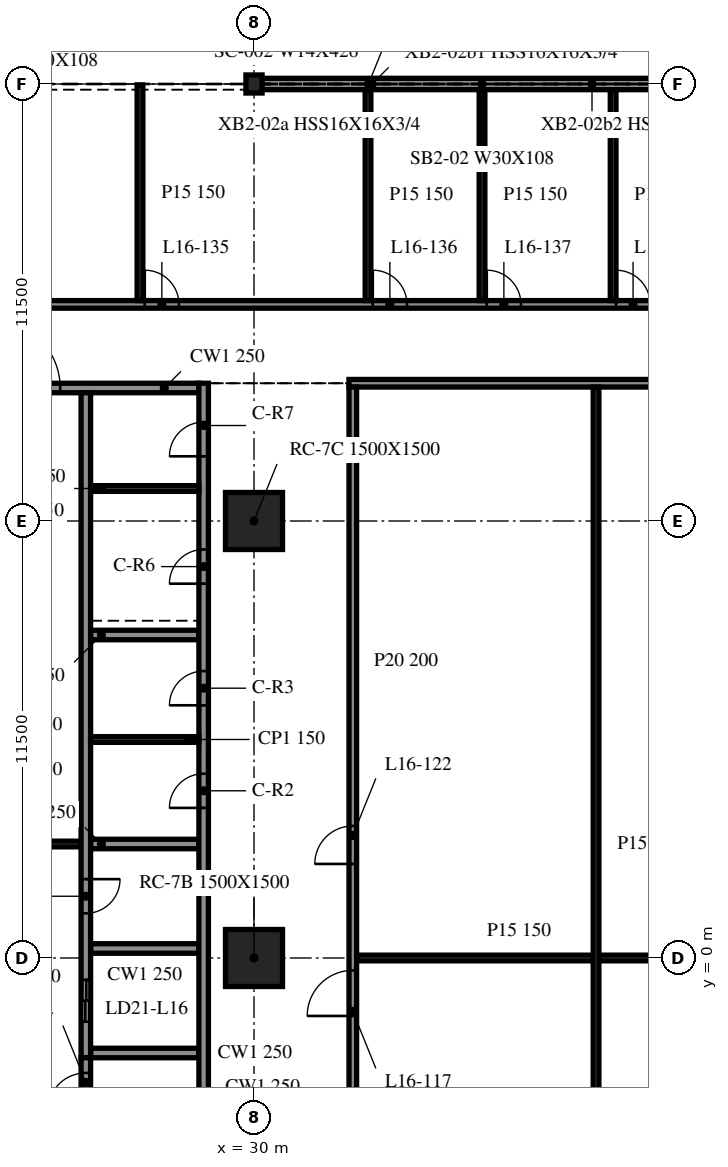
"""IFC4 building model, lengths in metres.
Left out: names, types, materials, properties, quantities, classifications, styles, units other than length and angle.
Written with IfcOpenShell. Run it as: python <this file> out.ifc"""

import sys

from ifc_helpers import new_model, si_unit, direction, frame, frame_2d, origin, origin_2d, place, context, subcontext, project, spatial, rectangle, i_section, extrude, element, fill, save


model = new_model("IFC4")
c1 = context("Model", 3, precision=1e-05, world=origin(), true_north=direction((0.0, 1.0)))
c2 = subcontext(c1, "Body", "Model", "MODEL_VIEW")
j1 = project(units=[si_unit("LENGTHUNIT", "METRE"), si_unit("PLANEANGLEUNIT", "RADIAN")], contexts=[c1])
p1 = place(None, origin())
s1 = spatial("IfcSite", under=j1, at=p1, CompositionType="ELEMENT")
p2 = place(p1, origin())
s2 = spatial("IfcBuilding", under=s1, at=p2, CompositionType="ELEMENT")
p3 = place(p2, frame((0.0, 0.0, 71.8)))
s3 = spatial("IfcBuildingStorey", under=s2, at=p3, CompositionType="ELEMENT", Elevation=71.8)
for number, where, z_axis, x_axis in (
    (1, (30.0, 0.0, -0.34), (0.0, 0.0, 1.0), (1.0, 0.0, 0.0)),
    (2, (30.0, 11.5, -0.34), (0.0, 0.0, 1.0), (1.0, 0.0, 0.0)),
):
    element("IfcColumn", number, at=place(p3, frame(where, z_axis=z_axis, x_axis=x_axis)), inside=s3, PredefinedType="COLUMN", context=c2, shape_type="SweptSolid", body=[
        extrude(rectangle(XDim=1.5, YDim=1.5, at=origin_2d()), origin(), (0.0, 0.0, 1.0), 4.3),
    ])
p4 = place(p3, frame((30.0, 23.0, -0.34), z_axis=(0.0, 0.0, 1.0), x_axis=(1.0, 0.0, 0.0)))
e3 = element("IfcColumn", 3, at=p4, inside=s3, PredefinedType="COLUMN", context=c2, shape_type="SweptSolid", body=[
    extrude(i_section(OverallWidth=0.424, OverallDepth=0.475, WebThickness=0.048, FlangeThickness=0.077, at=origin_2d()), origin(), (0.0, 0.0, 1.0), 4.3),
])
p5 = place(p3, frame((41.976, 23.0, 0.0), z_axis=(0.0, 0.0, 1.0), x_axis=(-1.0, 0.0, 0.0)))
e4 = element("IfcWall", 4, at=p5, inside=s3, PredefinedType="NOTDEFINED", context=c2, shape_type="SweptSolid", body=[
    extrude(rectangle(XDim=11.952, YDim=0.3, at=frame_2d((5.976, 0.0))), origin(), (0.0, 0.0, 1.0), 3.203),
])
p6 = place(p3, frame((28.675, -9.125, 0.0), z_axis=(0.0, 0.0, 1.0), x_axis=(0.0, 1.0, 0.0)))
e5 = element("IfcWall", 5, at=p6, inside=s3, PredefinedType="SOLIDWALL", context=c2, shape_type="SweptSolid", body=[
    extrude(rectangle(XDim=24.25, YDim=0.25, at=frame_2d((12.125, 0.0))), origin(), (0.0, 0.0, 1.0), 3.96),
])
p7 = place(p6, frame((13.075, 0.0, 0.0)))
e6 = element("IfcOpeningElement", 6, at=p7, cuts=e5, PredefinedType="OPENING", context=c2, shape_type="SweptSolid", body=[
    extrude(rectangle(XDim=0.9, YDim=2.1, at=frame_2d((0.45, 1.05))), frame((0.0, 0.135, 0.0), z_axis=(0.0, -1.0, 0.0), x_axis=(1.0, 0.0, 0.0)), (0.0, 0.0, 1.0), 0.27),
])
p8 = place(p6, frame((15.775, 0.0, 0.0)))
e7 = element("IfcOpeningElement", 7, at=p8, cuts=e5, PredefinedType="OPENING", context=c2, shape_type="SweptSolid", body=[
    extrude(rectangle(XDim=0.9, YDim=2.1, at=frame_2d((0.45, 1.05))), frame((0.0, 0.135, 0.0), z_axis=(0.0, -1.0, 0.0), x_axis=(1.0, 0.0, 0.0)), (0.0, 0.0, 1.0), 0.27),
])
p9 = place(p6, frame((18.975, 0.0, 0.0)))
e8 = element("IfcOpeningElement", 8, at=p9, cuts=e5, PredefinedType="OPENING", context=c2, shape_type="SweptSolid", body=[
    extrude(rectangle(XDim=0.9, YDim=2.1, at=frame_2d((0.45, 1.05))), frame((0.0, 0.135, 0.0), z_axis=(0.0, -1.0, 0.0), x_axis=(1.0, 0.0, 0.0)), (0.0, 0.0, 1.0), 0.27),
])
p10 = place(p6, frame((22.327, 0.0, 0.0)))
e9 = element("IfcOpeningElement", 9, at=p10, cuts=e5, PredefinedType="OPENING", context=c2, shape_type="SweptSolid", body=[
    extrude(rectangle(XDim=0.9, YDim=2.1, at=frame_2d((0.45, 1.05))), frame((0.0, 0.135, 0.0), z_axis=(0.0, -1.0, 0.0), x_axis=(1.0, 0.0, 0.0)), (0.0, 0.0, 1.0), 0.27),
])
p11 = place(p3, frame((19.45, 15.0, 0.0), z_axis=(0.0, 0.0, 1.0), x_axis=(1.0, 0.0, 0.0)))
e10 = element("IfcWall", 10, at=p11, inside=s3, PredefinedType="SOLIDWALL", context=c2, shape_type="SweptSolid", body=[
    extrude(rectangle(XDim=9.1, YDim=0.25, at=frame_2d((4.55, 0.0))), origin(), (0.0, 0.0, 1.0), 3.96),
])
p12 = place(p11, frame((3.65, 0.0, 0.0)))
e11 = element("IfcOpeningElement", 11, at=p12, cuts=e10, PredefinedType="OPENING", context=c2, shape_type="SweptSolid", body=[
    extrude(rectangle(XDim=1.8, YDim=2.1, at=frame_2d((0.9, 1.05))), frame((0.0, 0.135, 0.0), z_axis=(0.0, -1.0, 0.0), x_axis=(1.0, 0.0, 0.0)), (0.0, 0.0, 1.0), 0.27),
])
p13 = place(p3, frame((25.575, -8.875, 0.0), z_axis=(0.0, 0.0, 1.0), x_axis=(0.0, 1.0, 0.0)))
e12 = element("IfcWall", 12, at=p13, inside=s3, PredefinedType="SOLIDWALL", context=c2, shape_type="SweptSolid", body=[
    extrude(rectangle(XDim=6.25, YDim=0.25, at=frame_2d((3.125, 0.0))), origin(), (0.0, 0.0, 1.0), 3.96),
])
p14 = place(p13, frame((4.85, 0.0, 0.0)))
e13 = element("IfcOpeningElement", 13, at=p14, cuts=e12, PredefinedType="OPENING", context=c2, shape_type="SweptSolid", body=[
    extrude(rectangle(XDim=1.0, YDim=2.1, at=frame_2d((0.5, 1.05))), frame((0.0, 0.135, 0.0), z_axis=(0.0, -1.0, 0.0), x_axis=(1.0, 0.0, 0.0)), (0.0, 0.0, 1.0), 0.27),
])
p15 = place(p3, frame((25.575, 14.875, 0.0), z_axis=(0.0, 0.0, 1.0), x_axis=(0.0, -1.0, 0.0)))
e14 = element("IfcWall", 14, at=p15, inside=s3, PredefinedType="SOLIDWALL", context=c2, shape_type="SweptSolid", body=[
    extrude(rectangle(XDim=17.5, YDim=0.25, at=frame_2d((8.75, 0.0))), origin(), (0.0, 0.0, 1.0), 3.96),
])
p16 = place(p15, frame((15.45, 0.0, 0.0)))
e15 = element("IfcOpeningElement", 15, at=p16, cuts=e14, PredefinedType="OPENING", context=c2, shape_type="SweptSolid", body=[
    extrude(rectangle(XDim=1.1, YDim=2.1, at=frame_2d((0.55, 1.05))), frame((0.0, 0.135, 0.0), z_axis=(0.0, -1.0, 0.0), x_axis=(1.0, 0.0, 0.0)), (0.0, 0.0, 1.0), 0.27),
])
p17 = place(p15, frame((12.8, 0.0, 0.0)))
e16 = element("IfcOpeningElement", 16, at=p17, cuts=e14, PredefinedType="OPENING", context=c2, shape_type="SweptSolid", body=[
    extrude(rectangle(XDim=0.9, YDim=2.1, at=frame_2d((0.45, 1.05))), frame((0.0, 0.135, 0.0), z_axis=(0.0, -1.0, 0.0), x_axis=(1.0, 0.0, 0.0)), (0.0, 0.0, 1.0), 0.27),
])
for number, where, z_axis, x_axis in (
    (17, (25.7, -2.5, 0.0), (0.0, 0.0, 1.0), (1.0, 0.0, 0.0)),
    (18, (25.7, 0.25, 0.0), (0.0, 0.0, 1.0), (1.0, 0.0, 0.0)),
    (19, (25.7, 3.0, 0.0), (0.0, 0.0, 1.0), (1.0, 0.0, 0.0)),
    (20, (25.7, 8.5, 0.0), (0.0, 0.0, 1.0), (1.0, 0.0, 0.0)),
):
    element("IfcWall", number, at=place(p3, frame(where, z_axis=z_axis, x_axis=x_axis)), inside=s3, PredefinedType="SOLIDWALL", context=c2, shape_type="SweptSolid", body=[
        extrude(rectangle(XDim=2.85, YDim=0.25, at=frame_2d((1.425, 0.0))), origin(), (0.0, 0.0, 1.0), 3.96),
    ])
p18 = place(p3, frame((22.55, 3.0, 0.0), z_axis=(0.0, 0.0, 1.0), x_axis=(1.0, 0.0, 0.0)))
e21 = element("IfcWall", 21, at=p18, inside=s3, PredefinedType="PARTITIONING", context=c2, shape_type="SweptSolid", body=[
    extrude(rectangle(XDim=2.9, YDim=0.15, at=frame_2d((1.45, 0.0))), origin(), (0.0, 0.0, 1.0), 3.96),
])
for number, where, z_axis, x_axis in (
    (22, (25.7, 5.75, 0.0), (0.0, 0.0, 1.0), (1.0, 0.0, 0.0)),
    (23, (25.7, 12.355, 0.0), (0.0, 0.0, 1.0), (1.0, 0.0, 0.0)),
):
    element("IfcWall", number, at=place(p3, frame(where, z_axis=z_axis, x_axis=x_axis)), inside=s3, PredefinedType="PARTITIONING", context=c2, shape_type="SweptSolid", body=[
        extrude(rectangle(XDim=2.85, YDim=0.15, at=frame_2d((1.425, 0.0))), origin(), (0.0, 0.0, 1.0), 3.96),
    ])
p19 = place(p3, frame((32.7, 0.0, 0.0), z_axis=(0.0, 0.0, 1.0), x_axis=(1.0, 0.0, 0.0)))
e24 = element("IfcWall", 24, at=p19, inside=s3, PredefinedType="PARTITIONING", context=c2, shape_type="SweptSolid", body=[
    extrude(rectangle(XDim=8.55, YDim=0.15, at=frame_2d((4.275, 0.0))), origin(), (0.0, 0.0, 1.0), 3.96),
])
p20 = place(p3, frame((32.5, 15.125, 0.0), z_axis=(0.0, 0.0, 1.0), x_axis=(1.0, 0.0, 0.0)))
e25 = element("IfcWall", 25, at=p20, inside=s3, PredefinedType="PARTITIONING", context=c2, shape_type="SweptSolid", body=[
    extrude(rectangle(XDim=19.45, YDim=0.2, at=frame_2d((9.725, 0.0))), origin(), (0.0, 0.0, 1.0), 3.96),
])
p21 = place(p3, frame((-41.975, 17.2, 0.0), z_axis=(0.0, 0.0, 1.0), x_axis=(1.0, 0.0, 0.0)))
e26 = element("IfcWall", 26, at=p21, inside=s3, PredefinedType="PARTITIONING", context=c2, shape_type="SweptSolid", body=[
    extrude(rectangle(XDim=95.782, YDim=0.2, at=frame_2d((47.891, 0.0))), origin(), (0.0, 0.0, 1.0), 3.96),
])
p22 = place(p21, frame((13.7, 0.0, 0.0)))
e27 = element("IfcOpeningElement", 27, at=p22, cuts=e26, PredefinedType="OPENING", context=c2, shape_type="SweptSolid", body=[
    extrude(rectangle(XDim=0.9, YDim=2.1, at=frame_2d((0.45, 1.05))), frame((0.0, 0.11, 0.0), z_axis=(0.0, -1.0, 0.0), x_axis=(1.0, 0.0, 0.0)), (0.0, 0.0, 1.0), 0.22),
])
p23 = place(p21, frame((19.7, 0.0, 0.0)))
e28 = element("IfcOpeningElement", 28, at=p23, cuts=e26, PredefinedType="OPENING", context=c2, shape_type="SweptSolid", body=[
    extrude(rectangle(XDim=0.9, YDim=2.1, at=frame_2d((0.45, 1.05))), frame((0.0, 0.11, 0.0), z_axis=(0.0, -1.0, 0.0), x_axis=(1.0, 0.0, 0.0)), (0.0, 0.0, 1.0), 0.22),
])
p24 = place(p21, frame((23.1, 0.0, 0.0)))
e29 = element("IfcOpeningElement", 29, at=p24, cuts=e26, PredefinedType="OPENING", context=c2, shape_type="SweptSolid", body=[
    extrude(rectangle(XDim=0.9, YDim=2.1, at=frame_2d((0.45, 1.05))), frame((0.0, 0.11, 0.0), z_axis=(0.0, -1.0, 0.0), x_axis=(1.0, 0.0, 0.0)), (0.0, 0.0, 1.0), 0.22),
])
p25 = place(p21, frame((25.7, 0.0, 0.0)))
e30 = element("IfcOpeningElement", 30, at=p25, cuts=e26, PredefinedType="OPENING", context=c2, shape_type="SweptSolid", body=[
    extrude(rectangle(XDim=0.9, YDim=2.1, at=frame_2d((0.45, 1.05))), frame((0.0, 0.11, 0.0), z_axis=(0.0, -1.0, 0.0), x_axis=(1.0, 0.0, 0.0)), (0.0, 0.0, 1.0), 0.22),
])
p26 = place(p21, frame((40.7, 0.0, 0.0)))
e31 = element("IfcOpeningElement", 31, at=p26, cuts=e26, PredefinedType="OPENING", context=c2, shape_type="SweptSolid", body=[
    extrude(rectangle(XDim=0.9, YDim=2.1, at=frame_2d((0.45, 1.05))), frame((0.0, 0.11, 0.0), z_axis=(0.0, -1.0, 0.0), x_axis=(1.0, 0.0, 0.0)), (0.0, 0.0, 1.0), 0.22),
])
p27 = place(p21, frame((46.7, 0.0, 0.0)))
e32 = element("IfcOpeningElement", 32, at=p27, cuts=e26, PredefinedType="OPENING", context=c2, shape_type="SweptSolid", body=[
    extrude(rectangle(XDim=0.9, YDim=2.1, at=frame_2d((0.45, 1.05))), frame((0.0, 0.11, 0.0), z_axis=(0.0, -1.0, 0.0), x_axis=(1.0, 0.0, 0.0)), (0.0, 0.0, 1.0), 0.22),
])
p28 = place(p21, frame((48.1, 0.0, 0.0)))
e33 = element("IfcOpeningElement", 33, at=p28, cuts=e26, PredefinedType="OPENING", context=c2, shape_type="SweptSolid", body=[
    extrude(rectangle(XDim=0.9, YDim=2.1, at=frame_2d((0.45, 1.05))), frame((0.0, 0.11, 0.0), z_axis=(0.0, -1.0, 0.0), x_axis=(1.0, 0.0, 0.0)), (0.0, 0.0, 1.0), 0.22),
])
p29 = place(p21, frame((51.5, 0.0, 0.0)))
e34 = element("IfcOpeningElement", 34, at=p29, cuts=e26, PredefinedType="OPENING", context=c2, shape_type="SweptSolid", body=[
    extrude(rectangle(XDim=0.9, YDim=2.1, at=frame_2d((0.45, 1.05))), frame((0.0, 0.11, 0.0), z_axis=(0.0, -1.0, 0.0), x_axis=(1.0, 0.0, 0.0)), (0.0, 0.0, 1.0), 0.22),
])
p30 = place(p21, frame((54.1, 0.0, 0.0)))
e35 = element("IfcOpeningElement", 35, at=p30, cuts=e26, PredefinedType="OPENING", context=c2, shape_type="SweptSolid", body=[
    extrude(rectangle(XDim=0.9, YDim=2.1, at=frame_2d((0.45, 1.05))), frame((0.0, 0.11, 0.0), z_axis=(0.0, -1.0, 0.0), x_axis=(1.0, 0.0, 0.0)), (0.0, 0.0, 1.0), 0.22),
])
p31 = place(p21, frame((69.1, 0.0, 0.0)))
e36 = element("IfcOpeningElement", 36, at=p31, cuts=e26, PredefinedType="OPENING", context=c2, shape_type="SweptSolid", body=[
    extrude(rectangle(XDim=0.9, YDim=2.1, at=frame_2d((0.45, 1.05))), frame((0.0, 0.11, 0.0), z_axis=(0.0, -1.0, 0.0), x_axis=(1.0, 0.0, 0.0)), (0.0, 0.0, 1.0), 0.22),
])
p32 = place(p21, frame((75.1, 0.0, 0.0)))
e37 = element("IfcOpeningElement", 37, at=p32, cuts=e26, PredefinedType="OPENING", context=c2, shape_type="SweptSolid", body=[
    extrude(rectangle(XDim=0.9, YDim=2.1, at=frame_2d((0.45, 1.05))), frame((0.0, 0.11, 0.0), z_axis=(0.0, -1.0, 0.0), x_axis=(1.0, 0.0, 0.0)), (0.0, 0.0, 1.0), 0.22),
])
p33 = place(p21, frame((78.1, 0.0, 0.0)))
e38 = element("IfcOpeningElement", 38, at=p33, cuts=e26, PredefinedType="OPENING", context=c2, shape_type="SweptSolid", body=[
    extrude(rectangle(XDim=0.9, YDim=2.1, at=frame_2d((0.45, 1.05))), frame((0.0, 0.11, 0.0), z_axis=(0.0, -1.0, 0.0), x_axis=(1.0, 0.0, 0.0)), (0.0, 0.0, 1.0), 0.22),
])
p34 = place(p21, frame((81.5, 0.0, 0.0)))
e39 = element("IfcOpeningElement", 39, at=p34, cuts=e26, PredefinedType="OPENING", context=c2, shape_type="SweptSolid", body=[
    extrude(rectangle(XDim=0.9, YDim=2.1, at=frame_2d((0.45, 1.05))), frame((0.0, 0.11, 0.0), z_axis=(0.0, -1.0, 0.0), x_axis=(1.0, 0.0, 0.0)), (0.0, 0.0, 1.0), 0.22),
])
p35 = place(p3, frame((27.0, 17.3, 0.0), z_axis=(0.0, 0.0, 1.0), x_axis=(0.0, 1.0, 0.0)))
e40 = element("IfcWall", 40, at=p35, inside=s3, PredefinedType="PARTITIONING", context=c2, shape_type="SweptSolid", body=[
    extrude(rectangle(XDim=5.675, YDim=0.15, at=frame_2d((2.837, 0.0))), origin(), (0.0, 0.0, 1.0), 3.96),
])
p36 = place(p3, frame((32.6, -9.025, 0.0), z_axis=(0.0, 0.0, 1.0), x_axis=(0.0, 1.0, 0.0)))
e41 = element("IfcWall", 41, at=p36, inside=s3, PredefinedType="PARTITIONING", context=c2, shape_type="SweptSolid", body=[
    extrude(rectangle(XDim=24.05, YDim=0.2, at=frame_2d((12.025, 0.0))), origin(), (0.0, 0.0, 1.0), 3.96),
])
p37 = place(p36, frame((7.5, 0.0, 0.0)))
e42 = element("IfcOpeningElement", 42, at=p37, cuts=e41, PredefinedType="OPENING", context=c2, shape_type="SweptSolid", body=[
    extrude(rectangle(XDim=1.2, YDim=2.1, at=frame_2d((0.6, 1.05))), frame((0.0, 0.11, 0.0), z_axis=(0.0, -1.0, 0.0), x_axis=(1.0, 0.0, 0.0)), (0.0, 0.0, 1.0), 0.22),
])
p38 = place(p36, frame((11.5, 0.0, 0.0)))
e43 = element("IfcOpeningElement", 43, at=p38, cuts=e41, PredefinedType="OPENING", context=c2, shape_type="SweptSolid", body=[
    extrude(rectangle(XDim=1.0, YDim=2.1, at=frame_2d((0.5, 1.05))), frame((0.0, 0.11, 0.0), z_axis=(0.0, -1.0, 0.0), x_axis=(1.0, 0.0, 0.0)), (0.0, 0.0, 1.0), 0.22),
])
for number, where, z_axis, x_axis in (
    (44, (33.0, 17.3, 0.0), (0.0, 0.0, 1.0), (0.0, 1.0, 0.0)),
    (45, (36.0, 17.3, 0.0), (0.0, 0.0, 1.0), (0.0, 1.0, 0.0)),
):
    element("IfcWall", number, at=place(p3, frame(where, z_axis=z_axis, x_axis=x_axis)), inside=s3, PredefinedType="PARTITIONING", context=c2, shape_type="SweptSolid", body=[
        extrude(rectangle(XDim=5.55, YDim=0.15, at=frame_2d((2.775, 0.0))), origin(), (0.0, 0.0, 1.0), 3.96),
    ])
p39 = place(p3, frame((39.0, -9.025, 0.0), z_axis=(0.0, 0.0, 1.0), x_axis=(0.0, 1.0, 0.0)))
e46 = element("IfcWall", 46, at=p39, inside=s3, PredefinedType="PARTITIONING", context=c2, shape_type="SweptSolid", body=[
    extrude(rectangle(XDim=24.05, YDim=0.15, at=frame_2d((12.025, 0.0))), origin(), (0.0, 0.0, 1.0), 3.96),
])
p40 = place(p3, frame((39.45, 17.3, 0.0), z_axis=(0.0, 0.0, 1.0), x_axis=(0.0, 1.0, 0.0)))
e47 = element("IfcWall", 47, at=p40, inside=s3, PredefinedType="PARTITIONING", context=c2, shape_type="SweptSolid", body=[
    extrude(rectangle(XDim=5.55, YDim=0.15, at=frame_2d((2.775, 0.0))), origin(), (0.0, 0.0, 1.0), 3.96),
])
p41 = place(p12, origin())
e48 = element("IfcDoor", 48, at=p41, inside=s3, OperationType="DOUBLE_DOOR_SINGLE_SWING", PredefinedType="DOOR", context=c2, shape_type="SweptSolid", body=[
    extrude(rectangle(XDim=1.8, YDim=2.1, at=frame_2d((0.9, 1.05))), frame((0.0, 0.025, 0.0), z_axis=(0.0, -1.0, 0.0), x_axis=(1.0, 0.0, 0.0)), (0.0, 0.0, 1.0), 0.05),
])
fill(e11, e48)
p42 = place(p16, origin())
e49 = element("IfcDoor", 49, at=p42, inside=s3, OperationType="DOUBLE_DOOR_SLIDING", PredefinedType="DOOR", context=c2, shape_type="SweptSolid", body=[
    extrude(rectangle(XDim=1.1, YDim=2.1, at=frame_2d((0.55, 1.05))), frame((0.0, 0.025, 0.0), z_axis=(0.0, -1.0, 0.0), x_axis=(1.0, 0.0, 0.0)), (0.0, 0.0, 1.0), 0.05),
])
fill(e15, e49)
p43 = place(p17, origin())
e50 = element("IfcDoor", 50, at=p43, inside=s3, OperationType="SINGLE_SWING_LEFT", PredefinedType="DOOR", context=c2, shape_type="SweptSolid", body=[
    extrude(rectangle(XDim=0.9, YDim=2.1, at=frame_2d((0.45, 1.05))), frame((0.0, 0.025, 0.0), z_axis=(0.0, -1.0, 0.0), x_axis=(1.0, 0.0, 0.0)), (0.0, 0.0, 1.0), 0.05),
])
fill(e16, e50)
p44 = place(p7, origin())
e51 = element("IfcDoor", 51, at=p44, inside=s3, OperationType="SINGLE_SWING_RIGHT", PredefinedType="DOOR", context=c2, shape_type="SweptSolid", body=[
    extrude(rectangle(XDim=0.9, YDim=2.1, at=frame_2d((0.45, 1.05))), frame((0.0, 0.025, 0.0), z_axis=(0.0, -1.0, 0.0), x_axis=(1.0, 0.0, 0.0)), (0.0, 0.0, 1.0), 0.05),
])
fill(e6, e51)
p45 = place(p8, origin())
e52 = element("IfcDoor", 52, at=p45, inside=s3, OperationType="SINGLE_SWING_LEFT", PredefinedType="DOOR", context=c2, shape_type="SweptSolid", body=[
    extrude(rectangle(XDim=0.9, YDim=2.1, at=frame_2d((0.45, 1.05))), frame((0.0, 0.025, 0.0), z_axis=(0.0, -1.0, 0.0), x_axis=(1.0, 0.0, 0.0)), (0.0, 0.0, 1.0), 0.05),
])
fill(e7, e52)
p46 = place(p9, origin())
e53 = element("IfcDoor", 53, at=p46, inside=s3, OperationType="SINGLE_SWING_RIGHT", PredefinedType="DOOR", context=c2, shape_type="SweptSolid", body=[
    extrude(rectangle(XDim=0.9, YDim=2.1, at=frame_2d((0.45, 1.05))), frame((0.0, 0.025, 0.0), z_axis=(0.0, -1.0, 0.0), x_axis=(1.0, 0.0, 0.0)), (0.0, 0.0, 1.0), 0.05),
])
fill(e8, e53)
p47 = place(p10, origin())
e54 = element("IfcDoor", 54, at=p47, inside=s3, OperationType="SINGLE_SWING_LEFT", PredefinedType="DOOR", context=c2, shape_type="SweptSolid", body=[
    extrude(rectangle(XDim=0.9, YDim=2.1, at=frame_2d((0.45, 1.05))), frame((0.0, 0.025, 0.0), z_axis=(0.0, -1.0, 0.0), x_axis=(1.0, 0.0, 0.0)), (0.0, 0.0, 1.0), 0.05),
])
fill(e9, e54)
p48 = place(p14, origin())
e55 = element("IfcDoor", 55, at=p48, inside=s3, OperationType="SINGLE_SWING_LEFT", PredefinedType="DOOR", context=c2, shape_type="SweptSolid", body=[
    extrude(rectangle(XDim=1.0, YDim=2.1, at=frame_2d((0.5, 1.05))), frame((0.0, 0.025, 0.0), z_axis=(0.0, -1.0, 0.0), x_axis=(1.0, 0.0, 0.0)), (0.0, 0.0, 1.0), 0.05),
])
fill(e13, e55)
p49 = place(p37, origin())
e56 = element("IfcDoor", 56, at=p49, inside=s3, OperationType="SINGLE_SWING_RIGHT", PredefinedType="DOOR", context=c2, shape_type="SweptSolid", body=[
    extrude(rectangle(XDim=1.2, YDim=2.1, at=frame_2d((0.6, 1.05))), frame((0.0, 0.025, 0.0), z_axis=(0.0, -1.0, 0.0), x_axis=(1.0, 0.0, 0.0)), (0.0, 0.0, 1.0), 0.05),
])
fill(e42, e56)
p50 = place(p38, origin())
e57 = element("IfcDoor", 57, at=p50, inside=s3, OperationType="SINGLE_SWING_RIGHT", PredefinedType="DOOR", context=c2, shape_type="SweptSolid", body=[
    extrude(rectangle(XDim=1.0, YDim=2.1, at=frame_2d((0.5, 1.05))), frame((0.0, 0.025, 0.0), z_axis=(0.0, -1.0, 0.0), x_axis=(1.0, 0.0, 0.0)), (0.0, 0.0, 1.0), 0.05),
])
fill(e43, e57)
p51 = place(p31, origin())
e58 = element("IfcDoor", 58, at=p51, inside=s3, OperationType="SINGLE_SWING_RIGHT", PredefinedType="DOOR", context=c2, shape_type="SweptSolid", body=[
    extrude(rectangle(XDim=0.9, YDim=2.1, at=frame_2d((0.45, 1.05))), frame((0.0, 0.025, 0.0), z_axis=(0.0, -1.0, 0.0), x_axis=(1.0, 0.0, 0.0)), (0.0, 0.0, 1.0), 0.05),
])
fill(e36, e58)
p52 = place(p32, origin())
e59 = element("IfcDoor", 59, at=p52, inside=s3, OperationType="SINGLE_SWING_RIGHT", PredefinedType="DOOR", context=c2, shape_type="SweptSolid", body=[
    extrude(rectangle(XDim=0.9, YDim=2.1, at=frame_2d((0.45, 1.05))), frame((0.0, 0.025, 0.0), z_axis=(0.0, -1.0, 0.0), x_axis=(1.0, 0.0, 0.0)), (0.0, 0.0, 1.0), 0.05),
])
fill(e37, e59)
p53 = place(p33, origin())
e60 = element("IfcDoor", 60, at=p53, inside=s3, OperationType="SINGLE_SWING_RIGHT", PredefinedType="DOOR", context=c2, shape_type="SweptSolid", body=[
    extrude(rectangle(XDim=0.9, YDim=2.1, at=frame_2d((0.45, 1.05))), frame((0.0, 0.025, 0.0), z_axis=(0.0, -1.0, 0.0), x_axis=(1.0, 0.0, 0.0)), (0.0, 0.0, 1.0), 0.05),
])
fill(e38, e60)
p54 = place(p34, origin())
e61 = element("IfcDoor", 61, at=p54, inside=s3, OperationType="SINGLE_SWING_RIGHT", PredefinedType="DOOR", context=c2, shape_type="SweptSolid", body=[
    extrude(rectangle(XDim=0.9, YDim=2.1, at=frame_2d((0.45, 1.05))), frame((0.0, 0.025, 0.0), z_axis=(0.0, -1.0, 0.0), x_axis=(1.0, 0.0, 0.0)), (0.0, 0.0, 1.0), 0.05),
])
fill(e39, e61)
save(model, sys.argv[1])
